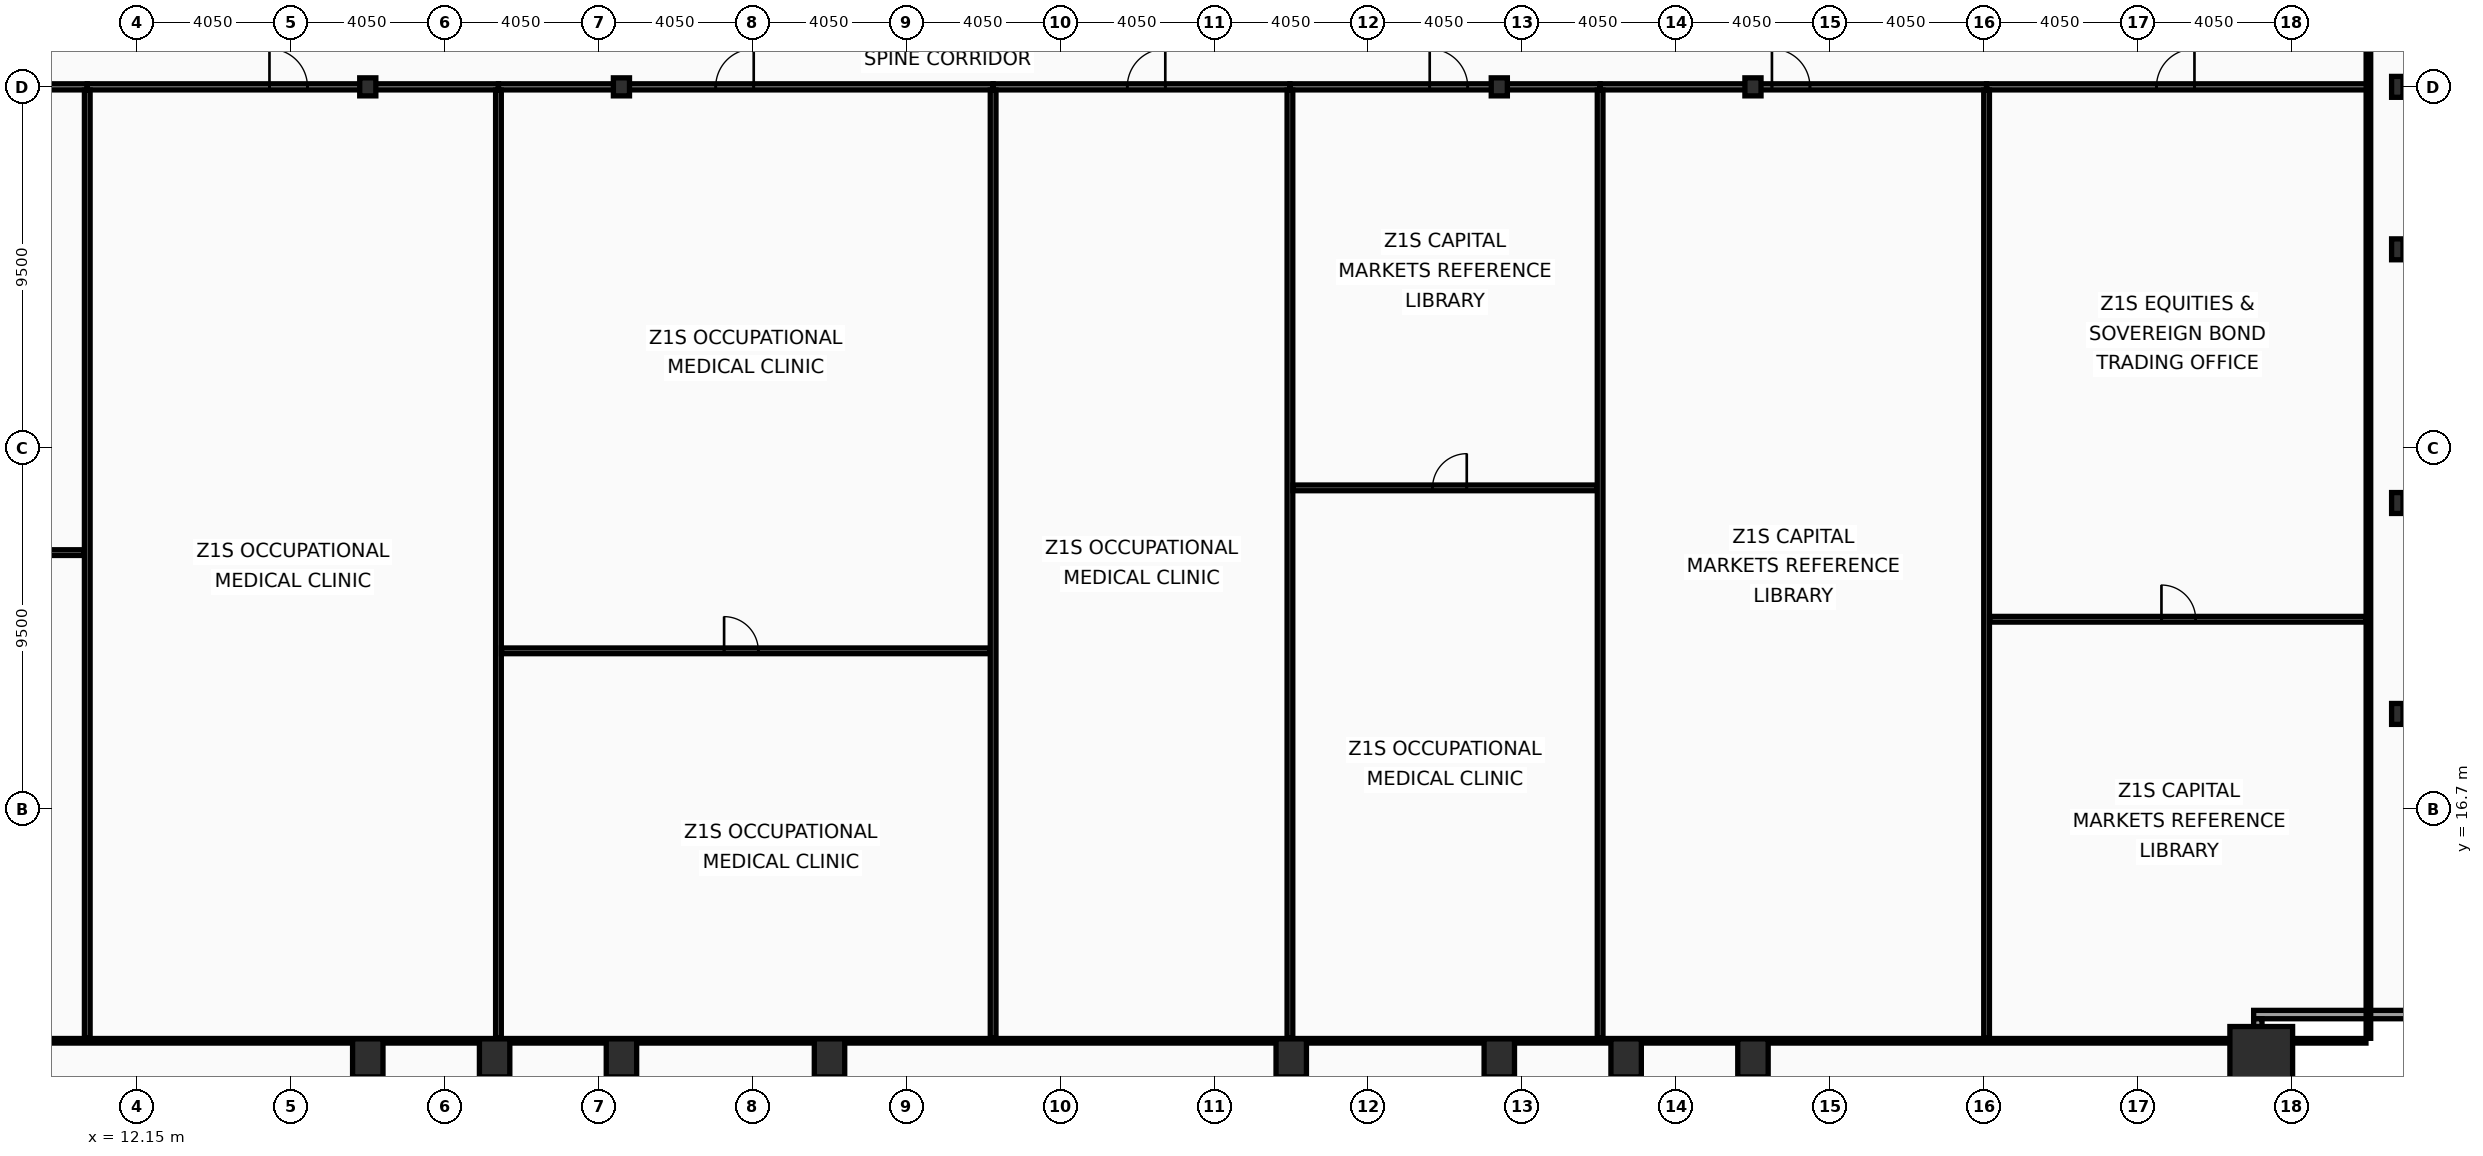
"""IFC4 building model, lengths in metres.
Left out: names, types, materials, properties, quantities, classifications, styles, units other than length and angle.
Written with IfcOpenShell. Run it as: python <this file> out.ifc"""

import sys

from ifc_helpers import new_model, si_unit, direction, frame, frame_2d, origin, origin_2d, place, context, subcontext, project, spatial, rectangle, hollow_rectangle, i_section, extrude, element, fill, save


model = new_model("IFC4")
c1 = context("Model", 3, precision=1e-05, world=origin(), true_north=direction((0.0, 1.0)))
c2 = subcontext(c1, "Body", "Model", "MODEL_VIEW")
j1 = project(units=[si_unit("LENGTHUNIT", "METRE"), si_unit("PLANEANGLEUNIT", "RADIAN")], contexts=[c1])
p1 = place(None, origin())
s1 = spatial("IfcSite", under=j1, at=p1, CompositionType="ELEMENT")
p2 = place(p1, origin())
s2 = spatial("IfcBuilding", under=s1, at=p2, CompositionType="ELEMENT")
p3 = place(p2, frame((0.0, 0.0, 61.8)))
s3 = spatial("IfcBuildingStorey", under=s2, at=p3, CompositionType="ELEMENT", Elevation=61.8)
p4 = place(p3, frame((68.05, 10.15, 0.0), z_axis=(0.0, 0.0, 1.0), x_axis=(1.0, 0.0, 0.0)))
e1 = element("IfcColumn", 1, at=p4, inside=s3, PredefinedType="COLUMN", context=c2, shape_type="SweptSolid", body=[
    extrude(hollow_rectangle(XDim=1.65, YDim=1.65, WallThickness=0.075, at=origin_2d()), origin(), (0.0, 0.0, 1.0), 4.0),
])
for number, where, z_axis, x_axis in (
    (2, (18.225, 10.15, 0.0), (0.0, 0.0, 1.0), (1.0, 0.0, 0.0)),
    (3, (21.562, 10.15, 0.0), (0.0, 0.0, 1.0), (1.0, 0.0, 0.0)),
    (4, (24.9, 10.15, 0.0), (0.0, 0.0, 1.0), (1.0, 0.0, 0.0)),
    (5, (30.375, 10.15, 0.0), (0.0, 0.0, 1.0), (1.0, 0.0, 0.0)),
    (6, (42.525, 10.15, 0.0), (0.0, 0.0, 1.0), (1.0, 0.0, 0.0)),
    (7, (48.0, 10.15, 0.0), (0.0, 0.0, 1.0), (1.0, 0.0, 0.0)),
    (8, (51.337, 10.15, 0.0), (0.0, 0.0, 1.0), (1.0, 0.0, 0.0)),
    (9, (54.675, 10.15, 0.0), (0.0, 0.0, 1.0), (1.0, 0.0, 0.0)),
):
    element("IfcColumn", number, at=place(p3, frame(where, z_axis=z_axis, x_axis=x_axis)), inside=s3, PredefinedType="COLUMN", context=c2, shape_type="SweptSolid", body=[
        extrude(hollow_rectangle(XDim=0.8, YDim=1.0, WallThickness=0.055, at=origin_2d()), origin(), (0.0, 0.0, 1.0), 4.0),
    ])
for number, where, z_axis, x_axis in (
    (10, (71.63, 19.2, 0.0), (0.0, 0.0, 1.0), (1.0, 0.0, 0.0)),
    (11, (71.63, 24.75, 0.0), (0.0, 0.0, 1.0), (1.0, 0.0, 0.0)),
    (12, (71.63, 31.425, 0.0), (0.0, 0.0, 1.0), (1.0, 0.0, 0.0)),
    (13, (71.63, 35.7, 0.0), (0.0, 0.0, 1.0), (1.0, 0.0, 0.0)),
):
    element("IfcColumn", number, at=place(p3, frame(where, z_axis=z_axis, x_axis=x_axis)), inside=s3, PredefinedType="COLUMN", context=c2, shape_type="SweptSolid", body=[
        extrude(i_section(OverallWidth=0.3, OverallDepth=0.55, WebThickness=0.015, FlangeThickness=0.029, at=origin_2d()), origin(), (0.0, 0.0, 1.0), 4.0),
    ])
for number, where, z_axis, x_axis in (
    (14, (18.225, 35.7, 0.0), (0.0, 0.0, 1.0), (1.0, 0.0, 0.0)),
    (15, (24.9, 35.7, 0.0), (0.0, 0.0, 1.0), (1.0, 0.0, 0.0)),
    (16, (48.0, 35.7, 0.0), (0.0, 0.0, 1.0), (1.0, 0.0, 0.0)),
    (17, (54.675, 35.7, 0.0), (0.0, 0.0, 1.0), (1.0, 0.0, 0.0)),
):
    element("IfcColumn", number, at=place(p3, frame(where, z_axis=z_axis, x_axis=x_axis)), inside=s3, PredefinedType="COLUMN", context=c2, shape_type="SweptSolid", body=[
        extrude(i_section(OverallWidth=0.424, OverallDepth=0.474, WebThickness=0.048, FlangeThickness=0.077, at=origin_2d()), origin(), (0.0, 0.0, 1.0), 4.0),
    ])
p5 = place(p3, frame((72.07, 11.29, 0.0), z_axis=(0.0, 0.0, 1.0), x_axis=(-1.0, 0.0, 0.0)))
e18 = element("IfcWall", 18, at=p5, inside=s3, PredefinedType="SOLIDWALL", context=c2, shape_type="SweptSolid", body=[
    extrude(rectangle(XDim=4.22, YDim=0.22, at=frame_2d((2.11, 0.0))), origin(), (0.0, 0.0, 1.0), 3.16),
])
p6 = place(p3, frame((67.96, 11.18, 0.0), z_axis=(0.0, 0.0, 1.0), x_axis=(0.0, -1.0, 0.0)))
e19 = element("IfcWall", 19, at=p6, inside=s3, PredefinedType="SOLIDWALL", context=c2, shape_type="SweptSolid", body=[
    extrude(rectangle(XDim=3.91, YDim=0.22, at=frame_2d((1.955, 0.0))), origin(), (0.0, 0.0, 1.0), 3.16),
])
p7 = place(p3, frame((2.03, 35.7, 0.0), z_axis=(0.0, 0.0, 1.0), x_axis=(1.0, 0.0, 0.0)))
e20 = element("IfcWall", 20, at=p7, inside=s3, PredefinedType="PARTITIONING", context=c2, shape_type="SweptSolid", body=[
    extrude(rectangle(XDim=8.813, YDim=0.16, at=frame_2d((4.407, 0.0))), origin(), (0.0, 0.0, 1.0), 3.01),
])
p8 = place(p7, frame((3.952, 0.0, 0.0)))
e21 = element("IfcOpeningElement", 21, at=p8, cuts=e20, PredefinedType="OPENING", context=c2, shape_type="SweptSolid", body=[
    extrude(rectangle(XDim=1.0, YDim=2.05, at=frame_2d((0.5, 1.025))), frame((0.0, 0.09, 0.0), z_axis=(0.0, -1.0, 0.0), x_axis=(1.0, 0.0, 0.0)), (0.0, 0.0, 1.0), 0.18),
])
p9 = place(p3, frame((2.095, 23.445, 0.0), z_axis=(0.0, 0.0, 1.0), x_axis=(1.0, 0.0, 0.0)))
e22 = element("IfcWall", 22, at=p9, inside=s3, PredefinedType="PARTITIONING", context=c2, shape_type="SweptSolid", body=[
    extrude(rectangle(XDim=8.668, YDim=0.15, at=frame_2d((4.334, 0.0))), origin(), (0.0, 0.0, 1.0), 3.82),
])
p10 = place(p9, frame((3.966, 0.0, 0.0)))
e23 = element("IfcOpeningElement", 23, at=p10, cuts=e22, PredefinedType="OPENING", context=c2, shape_type="SweptSolid", body=[
    extrude(rectangle(XDim=0.9, YDim=2.05, at=frame_2d((0.45, 1.025))), frame((0.0, 0.085, 0.0), z_axis=(0.0, -1.0, 0.0), x_axis=(1.0, 0.0, 0.0)), (0.0, 0.0, 1.0), 0.17),
])
p11 = place(p3, frame((10.844, 35.7, 0.0), z_axis=(0.0, 0.0, 1.0), x_axis=(1.0, 0.0, 0.0)))
e24 = element("IfcWall", 24, at=p11, inside=s3, PredefinedType="PARTITIONING", context=c2, shape_type="SweptSolid", body=[
    extrude(rectangle(XDim=10.82, YDim=0.16, at=frame_2d((5.41, 0.0))), origin(), (0.0, 0.0, 1.0), 3.01),
])
p12 = place(p11, frame((4.794, 0.0, 0.0)))
e25 = element("IfcOpeningElement", 25, at=p12, cuts=e24, PredefinedType="OPENING", context=c2, shape_type="SweptSolid", body=[
    extrude(rectangle(XDim=1.0, YDim=2.05, at=frame_2d((0.5, 1.025))), frame((0.0, 0.09, 0.0), z_axis=(0.0, -1.0, 0.0), x_axis=(1.0, 0.0, 0.0)), (0.0, 0.0, 1.0), 0.18),
])
p13 = place(p3, frame((10.844, 10.665, 0.0), z_axis=(0.0, 0.0, 1.0), x_axis=(0.0, 1.0, 0.0)))
e26 = element("IfcWall", 26, at=p13, inside=s3, PredefinedType="PARTITIONING", context=c2, shape_type="SweptSolid", body=[
    extrude(rectangle(XDim=24.95, YDim=0.15, at=frame_2d((12.475, 0.0))), origin(), (0.0, 0.0, 1.0), 3.01),
])
p14 = place(p3, frame((21.664, 35.7, 0.0), z_axis=(0.0, 0.0, 1.0), x_axis=(1.0, 0.0, 0.0)))
e27 = element("IfcWall", 27, at=p14, inside=s3, PredefinedType="PARTITIONING", context=c2, shape_type="SweptSolid", body=[
    extrude(rectangle(XDim=13.017, YDim=0.16, at=frame_2d((6.508, 0.0))), origin(), (0.0, 0.0, 1.0), 3.01),
])
p15 = place(p14, frame((5.717, 0.0, 0.0)))
e28 = element("IfcOpeningElement", 28, at=p15, cuts=e27, PredefinedType="OPENING", context=c2, shape_type="SweptSolid", body=[
    extrude(rectangle(XDim=1.0, YDim=2.05, at=frame_2d((0.5, 1.025))), frame((0.0, 0.09, 0.0), z_axis=(0.0, -1.0, 0.0), x_axis=(1.0, 0.0, 0.0)), (0.0, 0.0, 1.0), 0.18),
])
p16 = place(p3, frame((21.664, 10.665, 0.0), z_axis=(0.0, 0.0, 1.0), x_axis=(0.0, 1.0, 0.0)))
e29 = element("IfcWall", 29, at=p16, inside=s3, PredefinedType="PARTITIONING", context=c2, shape_type="SweptSolid", body=[
    extrude(rectangle(XDim=24.95, YDim=0.15, at=frame_2d((12.475, 0.0))), origin(), (0.0, 0.0, 1.0), 3.21),
])
p17 = place(p3, frame((21.744, 20.861, 0.0), z_axis=(0.0, 0.0, 1.0), x_axis=(1.0, 0.0, 0.0)))
e30 = element("IfcWall", 30, at=p17, inside=s3, PredefinedType="PARTITIONING", context=c2, shape_type="SweptSolid", body=[
    extrude(rectangle(XDim=12.857, YDim=0.15, at=frame_2d((6.428, 0.0))), origin(), (0.0, 0.0, 1.0), 3.01),
])
p18 = place(p17, frame((5.858, 0.0, 0.0)))
e31 = element("IfcOpeningElement", 31, at=p18, cuts=e30, PredefinedType="OPENING", context=c2, shape_type="SweptSolid", body=[
    extrude(rectangle(XDim=0.9, YDim=2.05, at=frame_2d((0.45, 1.025))), frame((0.0, 0.085, 0.0), z_axis=(0.0, -1.0, 0.0), x_axis=(1.0, 0.0, 0.0)), (0.0, 0.0, 1.0), 0.17),
])
p19 = place(p3, frame((34.68, 35.7, 0.0), z_axis=(0.0, 0.0, 1.0), x_axis=(1.0, 0.0, 0.0)))
e32 = element("IfcWall", 32, at=p19, inside=s3, PredefinedType="PARTITIONING", context=c2, shape_type="SweptSolid", body=[
    extrude(rectangle(XDim=7.81, YDim=0.16, at=frame_2d((3.905, 0.0))), origin(), (0.0, 0.0, 1.0), 3.01),
])
p20 = place(p19, frame((3.53, 0.0, 0.0)))
e33 = element("IfcOpeningElement", 33, at=p20, cuts=e32, PredefinedType="OPENING", context=c2, shape_type="SweptSolid", body=[
    extrude(rectangle(XDim=1.0, YDim=2.05, at=frame_2d((0.5, 1.025))), frame((0.0, 0.09, 0.0), z_axis=(0.0, -1.0, 0.0), x_axis=(1.0, 0.0, 0.0)), (0.0, 0.0, 1.0), 0.18),
])
p21 = place(p3, frame((34.68, 10.665, 0.0), z_axis=(0.0, 0.0, 1.0), x_axis=(0.0, 1.0, 0.0)))
e34 = element("IfcWall", 34, at=p21, inside=s3, PredefinedType="PARTITIONING", context=c2, shape_type="SweptSolid", body=[
    extrude(rectangle(XDim=24.95, YDim=0.15, at=frame_2d((12.475, 0.0))), origin(), (0.0, 0.0, 1.0), 3.21),
])
p22 = place(p3, frame((42.49, 35.7, 0.0), z_axis=(0.0, 0.0, 1.0), x_axis=(1.0, 0.0, 0.0)))
e35 = element("IfcWall", 35, at=p22, inside=s3, PredefinedType="PARTITIONING", context=c2, shape_type="SweptSolid", body=[
    extrude(rectangle(XDim=8.163, YDim=0.16, at=frame_2d((4.082, 0.0))), origin(), (0.0, 0.0, 1.0), 3.01),
])
p23 = place(p22, frame((3.678, 0.0, 0.0)))
e36 = element("IfcOpeningElement", 36, at=p23, cuts=e35, PredefinedType="OPENING", context=c2, shape_type="SweptSolid", body=[
    extrude(rectangle(XDim=1.0, YDim=2.05, at=frame_2d((0.5, 1.025))), frame((0.0, 0.09, 0.0), z_axis=(0.0, -1.0, 0.0), x_axis=(1.0, 0.0, 0.0)), (0.0, 0.0, 1.0), 0.18),
])
p24 = place(p3, frame((42.49, 10.665, 0.0), z_axis=(0.0, 0.0, 1.0), x_axis=(0.0, 1.0, 0.0)))
e37 = element("IfcWall", 37, at=p24, inside=s3, PredefinedType="PARTITIONING", context=c2, shape_type="SweptSolid", body=[
    extrude(rectangle(XDim=24.95, YDim=0.15, at=frame_2d((12.475, 0.0))), origin(), (0.0, 0.0, 1.0), 3.01),
])
p25 = place(p3, frame((42.571, 25.148, 0.0), z_axis=(0.0, 0.0, 1.0), x_axis=(1.0, 0.0, 0.0)))
e38 = element("IfcWall", 38, at=p25, inside=s3, PredefinedType="PARTITIONING", context=c2, shape_type="SweptSolid", body=[
    extrude(rectangle(XDim=8.003, YDim=0.15, at=frame_2d((4.001, 0.0))), origin(), (0.0, 0.0, 1.0), 3.01),
])
p26 = place(p25, frame((3.673, 0.0, 0.0)))
e39 = element("IfcOpeningElement", 39, at=p26, cuts=e38, PredefinedType="OPENING", context=c2, shape_type="SweptSolid", body=[
    extrude(rectangle(XDim=0.9, YDim=2.05, at=frame_2d((0.45, 1.025))), frame((0.0, 0.085, 0.0), z_axis=(0.0, -1.0, 0.0), x_axis=(1.0, 0.0, 0.0)), (0.0, 0.0, 1.0), 0.17),
])
p27 = place(p3, frame((50.653, 35.7, 0.0), z_axis=(0.0, 0.0, 1.0), x_axis=(1.0, 0.0, 0.0)))
e40 = element("IfcWall", 40, at=p27, inside=s3, PredefinedType="PARTITIONING", context=c2, shape_type="SweptSolid", body=[
    extrude(rectangle(XDim=10.169, YDim=0.16, at=frame_2d((5.084, 0.0))), origin(), (0.0, 0.0, 1.0), 3.01),
])
p28 = place(p27, frame((4.521, 0.0, 0.0)))
e41 = element("IfcOpeningElement", 41, at=p28, cuts=e40, PredefinedType="OPENING", context=c2, shape_type="SweptSolid", body=[
    extrude(rectangle(XDim=1.0, YDim=2.05, at=frame_2d((0.5, 1.025))), frame((0.0, 0.09, 0.0), z_axis=(0.0, -1.0, 0.0), x_axis=(1.0, 0.0, 0.0)), (0.0, 0.0, 1.0), 0.18),
])
p29 = place(p3, frame((50.653, 10.665, 0.0), z_axis=(0.0, 0.0, 1.0), x_axis=(0.0, 1.0, 0.0)))
e42 = element("IfcWall", 42, at=p29, inside=s3, PredefinedType="PARTITIONING", context=c2, shape_type="SweptSolid", body=[
    extrude(rectangle(XDim=24.95, YDim=0.15, at=frame_2d((12.475, 0.0))), origin(), (0.0, 0.0, 1.0), 3.21),
])
p30 = place(p3, frame((60.823, 35.7, 0.0), z_axis=(0.0, 0.0, 1.0), x_axis=(1.0, 0.0, 0.0)))
e43 = element("IfcWall", 43, at=p30, inside=s3, PredefinedType="PARTITIONING", context=c2, shape_type="SweptSolid", body=[
    extrude(rectangle(XDim=10.048, YDim=0.16, at=frame_2d((5.024, 0.0))), origin(), (0.0, 0.0, 1.0), 3.01),
])
p31 = place(p30, frame((4.47, 0.0, 0.0)))
e44 = element("IfcOpeningElement", 44, at=p31, cuts=e43, PredefinedType="OPENING", context=c2, shape_type="SweptSolid", body=[
    extrude(rectangle(XDim=1.0, YDim=2.05, at=frame_2d((0.5, 1.025))), frame((0.0, 0.09, 0.0), z_axis=(0.0, -1.0, 0.0), x_axis=(1.0, 0.0, 0.0)), (0.0, 0.0, 1.0), 0.18),
])
p32 = place(p3, frame((60.823, 10.665, 0.0), z_axis=(0.0, 0.0, 1.0), x_axis=(0.0, 1.0, 0.0)))
e45 = element("IfcWall", 45, at=p32, inside=s3, PredefinedType="PARTITIONING", context=c2, shape_type="SweptSolid", body=[
    extrude(rectangle(XDim=24.95, YDim=0.15, at=frame_2d((12.475, 0.0))), origin(), (0.0, 0.0, 1.0), 3.01),
])
p33 = place(p3, frame((60.903, 21.692, 0.0), z_axis=(0.0, 0.0, 1.0), x_axis=(1.0, 0.0, 0.0)))
e46 = element("IfcWall", 46, at=p33, inside=s3, PredefinedType="PARTITIONING", context=c2, shape_type="SweptSolid", body=[
    extrude(rectangle(XDim=9.902, YDim=0.15, at=frame_2d((4.951, 0.0))), origin(), (0.0, 0.0, 1.0), 3.82),
])
p34 = place(p33, frame((4.521, 0.0, 0.0)))
e47 = element("IfcOpeningElement", 47, at=p34, cuts=e46, PredefinedType="OPENING", context=c2, shape_type="SweptSolid", body=[
    extrude(rectangle(XDim=0.9, YDim=2.05, at=frame_2d((0.45, 1.025))), frame((0.0, 0.085, 0.0), z_axis=(0.0, -1.0, 0.0), x_axis=(1.0, 0.0, 0.0)), (0.0, 0.0, 1.0), 0.17),
])
p35 = place(p3, frame((70.87, 10.665, 0.0), z_axis=(0.0, 0.0, 1.0), x_axis=(0.0, 1.0, 0.0)))
e48 = element("IfcWall", 48, at=p35, inside=s3, PredefinedType="PARTITIONING", context=c2, shape_type="SweptSolid", body=[
    extrude(rectangle(XDim=42.11, YDim=0.12, at=frame_2d((21.055, 0.0))), origin(), (0.0, 0.0, 1.0), 3.01),
])
p36 = place(p3, frame((2.095, 10.6, 0.0), z_axis=(0.0, 0.0, 1.0), x_axis=(1.0, 0.0, 0.0)))
e49 = element("IfcWall", 49, at=p36, inside=s3, PredefinedType="PARTITIONING", context=c2, shape_type="SweptSolid", body=[
    extrude(rectangle(XDim=68.71, YDim=0.12, at=frame_2d((34.355, 0.0))), origin(), (0.0, 0.0, 1.0), 3.01),
])
p37 = place(p12, origin())
e50 = element("IfcDoor", 50, at=p37, inside=s3, OperationType="SINGLE_SWING_LEFT", PredefinedType="DOOR", context=c2, shape_type="SweptSolid", body=[
    extrude(rectangle(XDim=1.0, YDim=2.05, at=frame_2d((0.5, 1.025))), frame((0.0, 0.025, 0.0), z_axis=(0.0, -1.0, 0.0), x_axis=(1.0, 0.0, 0.0)), (0.0, 0.0, 1.0), 0.05),
])
fill(e25, e50)
p38 = place(p15, origin())
e51 = element("IfcDoor", 51, at=p38, inside=s3, OperationType="SINGLE_SWING_RIGHT", PredefinedType="DOOR", context=c2, shape_type="SweptSolid", body=[
    extrude(rectangle(XDim=1.0, YDim=2.05, at=frame_2d((0.5, 1.025))), frame((0.0, 0.025, 0.0), z_axis=(0.0, -1.0, 0.0), x_axis=(1.0, 0.0, 0.0)), (0.0, 0.0, 1.0), 0.05),
])
fill(e28, e51)
p39 = place(p18, origin())
e52 = element("IfcDoor", 52, at=p39, inside=s3, OperationType="SINGLE_SWING_LEFT", PredefinedType="DOOR", context=c2, shape_type="SweptSolid", body=[
    extrude(rectangle(XDim=0.9, YDim=2.05, at=frame_2d((0.45, 1.025))), frame((0.0, 0.025, 0.0), z_axis=(0.0, -1.0, 0.0), x_axis=(1.0, 0.0, 0.0)), (0.0, 0.0, 1.0), 0.05),
])
fill(e31, e52)
p40 = place(p20, origin())
e53 = element("IfcDoor", 53, at=p40, inside=s3, OperationType="SINGLE_SWING_RIGHT", PredefinedType="DOOR", context=c2, shape_type="SweptSolid", body=[
    extrude(rectangle(XDim=1.0, YDim=2.05, at=frame_2d((0.5, 1.025))), frame((0.0, 0.025, 0.0), z_axis=(0.0, -1.0, 0.0), x_axis=(1.0, 0.0, 0.0)), (0.0, 0.0, 1.0), 0.05),
])
fill(e33, e53)
p41 = place(p23, origin())
e54 = element("IfcDoor", 54, at=p41, inside=s3, OperationType="SINGLE_SWING_LEFT", PredefinedType="DOOR", context=c2, shape_type="SweptSolid", body=[
    extrude(rectangle(XDim=1.0, YDim=2.05, at=frame_2d((0.5, 1.025))), frame((0.0, 0.025, 0.0), z_axis=(0.0, -1.0, 0.0), x_axis=(1.0, 0.0, 0.0)), (0.0, 0.0, 1.0), 0.05),
])
fill(e36, e54)
p42 = place(p26, origin())
e55 = element("IfcDoor", 55, at=p42, inside=s3, OperationType="SINGLE_SWING_RIGHT", PredefinedType="DOOR", context=c2, shape_type="SweptSolid", body=[
    extrude(rectangle(XDim=0.9, YDim=2.05, at=frame_2d((0.45, 1.025))), frame((0.0, 0.025, 0.0), z_axis=(0.0, -1.0, 0.0), x_axis=(1.0, 0.0, 0.0)), (0.0, 0.0, 1.0), 0.05),
])
fill(e39, e55)
p43 = place(p28, origin())
e56 = element("IfcDoor", 56, at=p43, inside=s3, OperationType="SINGLE_SWING_LEFT", PredefinedType="DOOR", context=c2, shape_type="SweptSolid", body=[
    extrude(rectangle(XDim=1.0, YDim=2.05, at=frame_2d((0.5, 1.025))), frame((0.0, 0.025, 0.0), z_axis=(0.0, -1.0, 0.0), x_axis=(1.0, 0.0, 0.0)), (0.0, 0.0, 1.0), 0.05),
])
fill(e41, e56)
p44 = place(p31, origin())
e57 = element("IfcDoor", 57, at=p44, inside=s3, OperationType="SINGLE_SWING_RIGHT", PredefinedType="DOOR", context=c2, shape_type="SweptSolid", body=[
    extrude(rectangle(XDim=1.0, YDim=2.05, at=frame_2d((0.5, 1.025))), frame((0.0, 0.025, 0.0), z_axis=(0.0, -1.0, 0.0), x_axis=(1.0, 0.0, 0.0)), (0.0, 0.0, 1.0), 0.05),
])
fill(e44, e57)
p45 = place(p34, origin())
e58 = element("IfcDoor", 58, at=p45, inside=s3, OperationType="SINGLE_SWING_LEFT", PredefinedType="DOOR", context=c2, shape_type="SweptSolid", body=[
    extrude(rectangle(XDim=0.9, YDim=2.05, at=frame_2d((0.45, 1.025))), frame((0.0, 0.025, 0.0), z_axis=(0.0, -1.0, 0.0), x_axis=(1.0, 0.0, 0.0)), (0.0, 0.0, 1.0), 0.05),
])
fill(e47, e58)
save(model, sys.argv[1])
